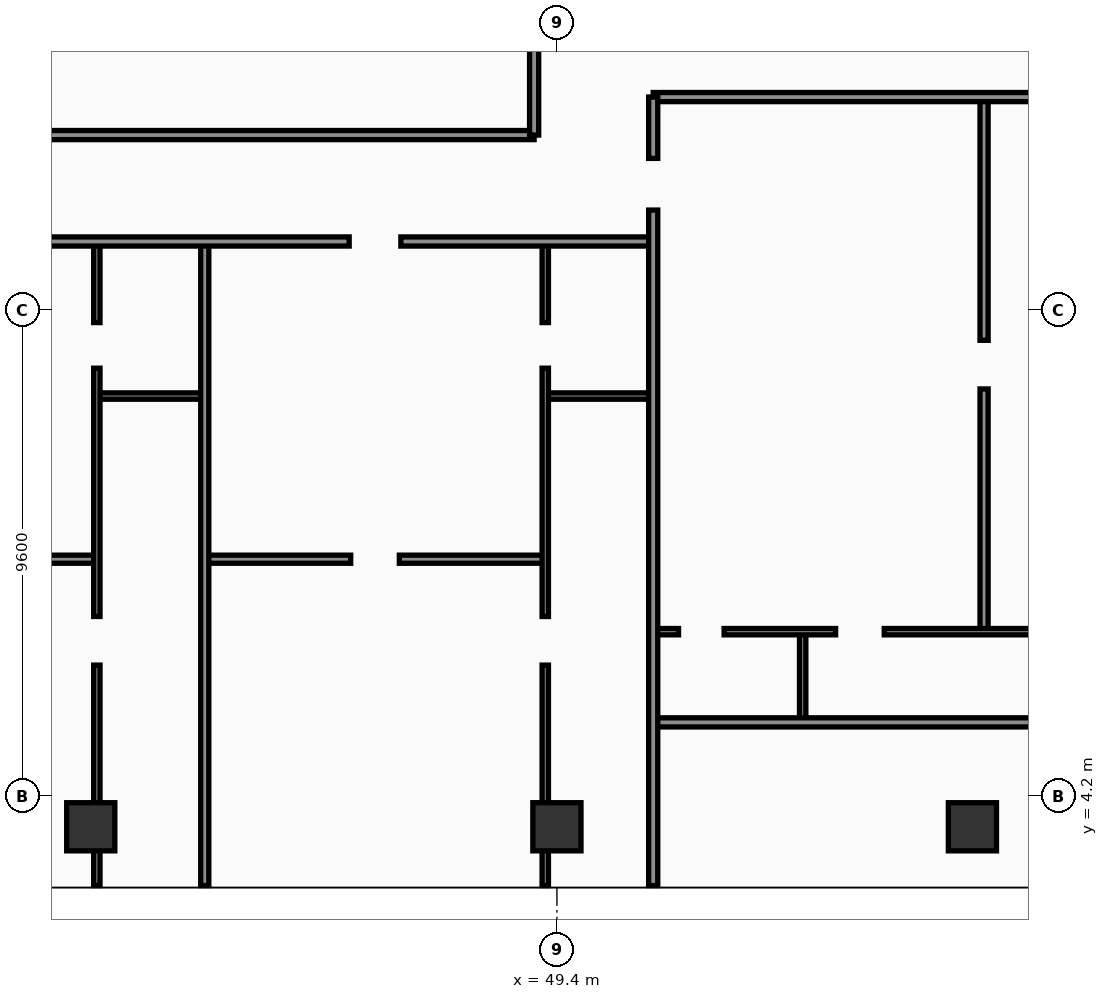
"""IFC4 building model, lengths in metres.
Left out: names, types, materials, properties, quantities, classifications, styles, units other than length and angle.
Written with IfcOpenShell. Run it as: python <this file> out.ifc"""

import sys

from ifc_helpers import new_model, si_unit, direction, frame, frame_2d, origin, origin_2d, place, context, subcontext, project, spatial, rectangle, hollow_rectangle, extrude, element, fill, save


model = new_model("IFC4")
c1 = context("Model", 3, precision=1e-05, world=origin(), true_north=direction((0.0, 1.0)))
c2 = subcontext(c1, "Body", "Model", "MODEL_VIEW")
j1 = project(units=[si_unit("LENGTHUNIT", "METRE"), si_unit("PLANEANGLEUNIT", "RADIAN")], contexts=[c1])
p1 = place(None, origin())
s1 = spatial("IfcSite", under=j1, at=p1, CompositionType="ELEMENT")
p2 = place(p1, origin())
s2 = spatial("IfcBuilding", under=s1, at=p2, CompositionType="ELEMENT")
p3 = place(p2, frame((0.0, 0.0, 66.0)))
s3 = spatial("IfcBuildingStorey", under=s2, at=p3, CompositionType="ELEMENT", Elevation=66.0)
for number, where, z_axis, x_axis in (
    (1, (40.2, 3.6, 0.0), (0.0, 0.0, 1.0), (1.0, 0.0, 0.0)),
    (2, (49.4, 3.6, 0.0), (0.0, 0.0, 1.0), (1.0, 0.0, 0.0)),
    (3, (57.6, 3.6, 0.0), (0.0, 0.0, 1.0), (1.0, 0.0, 0.0)),
):
    element("IfcColumn", number, at=place(p3, frame(where, z_axis=z_axis, x_axis=x_axis)), inside=s3, PredefinedType="COLUMN", context=c2, shape_type="SweptSolid", body=[
        extrude(hollow_rectangle(XDim=0.95, YDim=0.95, WallThickness=0.04, at=origin_2d()), origin(), (0.0, 0.0, 1.0), 3.56),
    ])
p4 = place(p3, frame((63.63, 5.505, 0.0), z_axis=(0.0, 0.0, 1.0), x_axis=(-0.300501856448, 0.953781229775, 0.0)))
e4 = element("IfcWall", 4, at=p4, inside=s3, PredefinedType="SOLIDWALL", context=c2, shape_type="SweptSolid", body=[
    extrude(rectangle(XDim=30.814, YDim=0.32, at=frame_2d((15.407, 0.0))), origin(), (0.0, 0.0, 1.0), 3.56),
])
p5 = place(p4, frame((18.796, 0.0, 0.0)))
e5 = element("IfcOpeningElement", 5, at=p5, cuts=e4, PredefinedType="OPENING", context=c2, shape_type="SweptSolid", body=[
    extrude(rectangle(XDim=1.4, YDim=2.25, at=frame_2d((0.7, 1.125))), frame((0.0, 0.17, 0.0), z_axis=(0.0, -1.0, 0.0), x_axis=(1.0, 0.0, 0.0)), (0.0, 0.0, 1.0), 0.34),
])
p6 = place(p4, frame((2.65, 0.0, 0.75)))
e6 = element("IfcOpeningElement", 6, at=p6, cuts=e4, PredefinedType="OPENING", context=c2, shape_type="SweptSolid", body=[
    extrude(rectangle(XDim=1.5, YDim=1.6, at=frame_2d((0.75, 0.8))), frame((0.0, 0.17, 0.0), z_axis=(0.0, -1.0, 0.0), x_axis=(1.0, 0.0, 0.0)), (0.0, 0.0, 1.0), 0.34),
])
p7 = place(p4, frame((4.7, 0.0, 0.75)))
e7 = element("IfcOpeningElement", 7, at=p7, cuts=e4, PredefinedType="OPENING", context=c2, shape_type="SweptSolid", body=[
    extrude(rectangle(XDim=1.5, YDim=1.6, at=frame_2d((0.75, 0.8))), frame((0.0, 0.17, 0.0), z_axis=(0.0, -1.0, 0.0), x_axis=(1.0, 0.0, 0.0)), (0.0, 0.0, 1.0), 0.34),
])
p8 = place(p4, frame((7.8, 0.0, 0.75)))
e8 = element("IfcOpeningElement", 8, at=p8, cuts=e4, PredefinedType="OPENING", context=c2, shape_type="SweptSolid", body=[
    extrude(rectangle(XDim=1.5, YDim=1.6, at=frame_2d((0.75, 0.8))), frame((0.0, 0.17, 0.0), z_axis=(0.0, -1.0, 0.0), x_axis=(1.0, 0.0, 0.0)), (0.0, 0.0, 1.0), 0.34),
])
p9 = place(p4, frame((10.9, 0.0, 0.75)))
e9 = element("IfcOpeningElement", 9, at=p9, cuts=e4, PredefinedType="OPENING", context=c2, shape_type="SweptSolid", body=[
    extrude(rectangle(XDim=1.5, YDim=1.6, at=frame_2d((0.75, 0.8))), frame((0.0, 0.17, 0.0), z_axis=(0.0, -1.0, 0.0), x_axis=(1.0, 0.0, 0.0)), (0.0, 0.0, 1.0), 0.34),
])
p10 = place(p4, frame((14.0, 0.0, 0.75)))
e10 = element("IfcOpeningElement", 10, at=p10, cuts=e4, PredefinedType="OPENING", context=c2, shape_type="SweptSolid", body=[
    extrude(rectangle(XDim=1.5, YDim=1.6, at=frame_2d((0.75, 0.8))), frame((0.0, 0.17, 0.0), z_axis=(0.0, -1.0, 0.0), x_axis=(1.0, 0.0, 0.0)), (0.0, 0.0, 1.0), 0.34),
])
p11 = place(p4, frame((16.55, 0.0, 0.75)))
e11 = element("IfcOpeningElement", 11, at=p11, cuts=e4, PredefinedType="OPENING", context=c2, shape_type="SweptSolid", body=[
    extrude(rectangle(XDim=1.5, YDim=1.6, at=frame_2d((0.75, 0.8))), frame((0.0, 0.17, 0.0), z_axis=(0.0, -1.0, 0.0), x_axis=(1.0, 0.0, 0.0)), (0.0, 0.0, 1.0), 0.34),
])
p12 = place(p4, frame((20.75, 0.0, 0.75)))
e12 = element("IfcOpeningElement", 12, at=p12, cuts=e4, PredefinedType="OPENING", context=c2, shape_type="SweptSolid", body=[
    extrude(rectangle(XDim=1.5, YDim=1.6, at=frame_2d((0.75, 0.8))), frame((0.0, 0.17, 0.0), z_axis=(0.0, -1.0, 0.0), x_axis=(1.0, 0.0, 0.0)), (0.0, 0.0, 1.0), 0.34),
])
p13 = place(p4, frame((23.3, 0.0, 0.75)))
e13 = element("IfcOpeningElement", 13, at=p13, cuts=e4, PredefinedType="OPENING", context=c2, shape_type="SweptSolid", body=[
    extrude(rectangle(XDim=1.5, YDim=1.6, at=frame_2d((0.75, 0.8))), frame((0.0, 0.17, 0.0), z_axis=(0.0, -1.0, 0.0), x_axis=(1.0, 0.0, 0.0)), (0.0, 0.0, 1.0), 0.34),
])
p14 = place(p4, frame((26.4, 0.0, 0.75)))
e14 = element("IfcOpeningElement", 14, at=p14, cuts=e4, PredefinedType="OPENING", context=c2, shape_type="SweptSolid", body=[
    extrude(rectangle(XDim=1.5, YDim=1.6, at=frame_2d((0.75, 0.8))), frame((0.0, 0.17, 0.0), z_axis=(0.0, -1.0, 0.0), x_axis=(1.0, 0.0, 0.0)), (0.0, 0.0, 1.0), 0.34),
])
p15 = place(p3, frame((40.32, 12.1, 0.0), z_axis=(0.0, 0.0, 1.0), x_axis=(1.0, 0.0, 0.0)))
e15 = element("IfcWall", 15, at=p15, inside=s3, PredefinedType="PARTITIONING", context=c2, shape_type="SweptSolid", body=[
    extrude(rectangle(XDim=2.13, YDim=0.125, at=frame_2d((1.065, 0.0))), origin(), (0.0, 0.0, 1.0), 3.56),
])
p16 = place(p3, frame((32.4, 8.88, 0.0), z_axis=(0.0, 0.0, 1.0), x_axis=(1.0, 0.0, 0.0)))
e16 = element("IfcWall", 16, at=p16, inside=s3, PredefinedType="PARTITIONING", context=c2, shape_type="SweptSolid", body=[
    extrude(rectangle(XDim=7.92, YDim=0.16, at=frame_2d((3.96, 0.0))), origin(), (0.0, 0.0, 1.0), 2.84),
])
p17 = place(p16, frame((3.48, 0.0, 0.0)))
e17 = element("IfcOpeningElement", 17, at=p17, cuts=e16, PredefinedType="OPENING", context=c2, shape_type="SweptSolid", body=[
    extrude(rectangle(XDim=0.96, YDim=2.2, at=frame_2d((0.48, 1.1))), frame((0.0, 0.09, 0.0), z_axis=(0.0, -1.0, 0.0), x_axis=(1.0, 0.0, 0.0)), (0.0, 0.0, 1.0), 0.18),
])
p18 = place(p3, frame((40.32, 2.44, 0.0), z_axis=(0.0, 0.0, 1.0), x_axis=(0.0, 1.0, 0.0)))
e18 = element("IfcWall", 18, at=p18, inside=s3, PredefinedType="PARTITIONING", context=c2, shape_type="SweptSolid", body=[
    extrude(rectangle(XDim=12.71, YDim=0.125, at=frame_2d((6.355, 0.0))), origin(), (0.0, 0.0, 1.0), 2.84),
])
p19 = place(p18, frame((4.35, 0.0, 0.0)))
e19 = element("IfcOpeningElement", 19, at=p19, cuts=e18, PredefinedType="OPENING", context=c2, shape_type="SweptSolid", body=[
    extrude(rectangle(XDim=0.96, YDim=2.2, at=frame_2d((0.48, 1.1))), frame((0.0, 0.073, 0.0), z_axis=(0.0, -1.0, 0.0), x_axis=(1.0, 0.0, 0.0)), (0.0, 0.0, 1.0), 0.145),
])
p20 = place(p18, frame((10.21, 0.0, 0.0)))
e20 = element("IfcOpeningElement", 20, at=p20, cuts=e18, PredefinedType="OPENING", context=c2, shape_type="SweptSolid", body=[
    extrude(rectangle(XDim=0.9, YDim=2.15, at=frame_2d((0.45, 1.075))), frame((0.0, 0.073, 0.0), z_axis=(0.0, -1.0, 0.0), x_axis=(1.0, 0.0, 0.0)), (0.0, 0.0, 1.0), 0.145),
])
p21 = place(p3, frame((49.17, 12.1, 0.0), z_axis=(0.0, 0.0, 1.0), x_axis=(1.0, 0.0, 0.0)))
e21 = element("IfcWall", 21, at=p21, inside=s3, PredefinedType="PARTITIONING", context=c2, shape_type="SweptSolid", body=[
    extrude(rectangle(XDim=2.13, YDim=0.125, at=frame_2d((1.065, 0.0))), origin(), (0.0, 0.0, 1.0), 3.56),
])
p22 = place(p3, frame((42.45, 8.88, 0.0), z_axis=(0.0, 0.0, 1.0), x_axis=(1.0, 0.0, 0.0)))
e22 = element("IfcWall", 22, at=p22, inside=s3, PredefinedType="PARTITIONING", context=c2, shape_type="SweptSolid", body=[
    extrude(rectangle(XDim=6.72, YDim=0.16, at=frame_2d((3.36, 0.0))), origin(), (0.0, 0.0, 1.0), 2.84),
])
p23 = place(p22, frame((2.88, 0.0, 0.0)))
e23 = element("IfcOpeningElement", 23, at=p23, cuts=e22, PredefinedType="OPENING", context=c2, shape_type="SweptSolid", body=[
    extrude(rectangle(XDim=0.96, YDim=2.2, at=frame_2d((0.48, 1.1))), frame((0.0, 0.09, 0.0), z_axis=(0.0, -1.0, 0.0), x_axis=(1.0, 0.0, 0.0)), (0.0, 0.0, 1.0), 0.18),
])
p24 = place(p3, frame((49.17, 2.44, 0.0), z_axis=(0.0, 0.0, 1.0), x_axis=(0.0, 1.0, 0.0)))
e24 = element("IfcWall", 24, at=p24, inside=s3, PredefinedType="PARTITIONING", context=c2, shape_type="SweptSolid", body=[
    extrude(rectangle(XDim=12.71, YDim=0.125, at=frame_2d((6.355, 0.0))), origin(), (0.0, 0.0, 1.0), 2.84),
])
p25 = place(p24, frame((4.35, 0.0, 0.0)))
e25 = element("IfcOpeningElement", 25, at=p25, cuts=e24, PredefinedType="OPENING", context=c2, shape_type="SweptSolid", body=[
    extrude(rectangle(XDim=0.96, YDim=2.2, at=frame_2d((0.48, 1.1))), frame((0.0, 0.073, 0.0), z_axis=(0.0, -1.0, 0.0), x_axis=(1.0, 0.0, 0.0)), (0.0, 0.0, 1.0), 0.145),
])
p26 = place(p24, frame((10.21, 0.0, 0.0)))
e26 = element("IfcOpeningElement", 26, at=p26, cuts=e24, PredefinedType="OPENING", context=c2, shape_type="SweptSolid", body=[
    extrude(rectangle(XDim=0.9, YDim=2.15, at=frame_2d((0.45, 1.075))), frame((0.0, 0.073, 0.0), z_axis=(0.0, -1.0, 0.0), x_axis=(1.0, 0.0, 0.0)), (0.0, 0.0, 1.0), 0.145),
])
p27 = place(p3, frame((42.45, 2.44, 0.0), z_axis=(0.0, 0.0, 1.0), x_axis=(0.0, 1.0, 0.0)))
e27 = element("IfcWall", 27, at=p27, inside=s3, PredefinedType="PARTITIONING", context=c2, shape_type="SweptSolid", body=[
    extrude(rectangle(XDim=12.71, YDim=0.16, at=frame_2d((6.355, 0.0))), origin(), (0.0, 0.0, 1.0), 3.04),
])
p28 = place(p3, frame((32.4, 15.15, 0.0), z_axis=(0.0, 0.0, 1.0), x_axis=(1.0, 0.0, 0.0)))
e28 = element("IfcWall", 28, at=p28, inside=s3, PredefinedType="PARTITIONING", context=c2, shape_type="SweptSolid", body=[
    extrude(rectangle(XDim=18.9, YDim=0.18, at=frame_2d((9.45, 0.0))), origin(), (0.0, 0.0, 1.0), 2.84),
])
p29 = place(p28, frame((3.55, 0.0, 0.0)))
e29 = element("IfcOpeningElement", 29, at=p29, cuts=e28, PredefinedType="OPENING", context=c2, shape_type="SweptSolid", body=[
    extrude(rectangle(XDim=1.02, YDim=2.2, at=frame_2d((0.51, 1.1))), frame((0.0, 0.1, 0.0), z_axis=(0.0, -1.0, 0.0), x_axis=(1.0, 0.0, 0.0)), (0.0, 0.0, 1.0), 0.2),
])
p30 = place(p28, frame((12.9, 0.0, 0.0)))
e30 = element("IfcOpeningElement", 30, at=p30, cuts=e28, PredefinedType="OPENING", context=c2, shape_type="SweptSolid", body=[
    extrude(rectangle(XDim=1.02, YDim=2.2, at=frame_2d((0.51, 1.1))), frame((0.0, 0.1, 0.0), z_axis=(0.0, -1.0, 0.0), x_axis=(1.0, 0.0, 0.0)), (0.0, 0.0, 1.0), 0.2),
])
p31 = place(p3, frame((21.5, 17.25, 0.0), z_axis=(0.0, 0.0, 1.0), x_axis=(1.0, 0.0, 0.0)))
e31 = element("IfcWall", 31, at=p31, inside=s3, PredefinedType="PARTITIONING", context=c2, shape_type="SweptSolid", body=[
    extrude(rectangle(XDim=27.45, YDim=0.18, at=frame_2d((13.725, 0.0))), origin(), (0.0, 0.0, 1.0), 2.84),
])
p32 = place(p31, frame((0.95, 0.0, 0.0)))
e32 = element("IfcOpeningElement", 32, at=p32, cuts=e31, PredefinedType="OPENING", context=c2, shape_type="SweptSolid", body=[
    extrude(rectangle(XDim=1.02, YDim=2.2, at=frame_2d((0.51, 1.1))), frame((0.0, 0.1, 0.0), z_axis=(0.0, -1.0, 0.0), x_axis=(1.0, 0.0, 0.0)), (0.0, 0.0, 1.0), 0.2),
])
p33 = place(p31, frame((15.28, 0.0, 0.0)))
e33 = element("IfcOpeningElement", 33, at=p33, cuts=e31, PredefinedType="OPENING", context=c2, shape_type="SweptSolid", body=[
    extrude(rectangle(XDim=1.02, YDim=2.2, at=frame_2d((0.51, 1.1))), frame((0.0, 0.1, 0.0), z_axis=(0.0, -1.0, 0.0), x_axis=(1.0, 0.0, 0.0)), (0.0, 0.0, 1.0), 0.2),
])
p34 = place(p3, frame((48.95, 17.25, 0.0), z_axis=(0.0, 0.0, 1.0), x_axis=(0.0, 1.0, 0.0)))
e34 = element("IfcWall", 34, at=p34, inside=s3, PredefinedType="PARTITIONING", context=c2, shape_type="SweptSolid", body=[
    extrude(rectangle(XDim=20.15, YDim=0.18, at=frame_2d((10.075, 0.0))), origin(), (0.0, 0.0, 1.0), 2.84),
])
p35 = place(p3, frame((54.25, 5.66, 0.0), z_axis=(0.0, 0.0, 1.0), x_axis=(0.0, 1.0, 0.0)))
e35 = element("IfcWall", 35, at=p35, inside=s3, PredefinedType="PARTITIONING", context=c2, shape_type="SweptSolid", body=[
    extrude(rectangle(XDim=1.79, YDim=0.125, at=frame_2d((0.895, 0.0))), origin(), (0.0, 0.0, 1.0), 3.56),
])
p36 = place(p3, frame((57.83, 7.45, 0.0), z_axis=(0.0, 0.0, 1.0), x_axis=(0.0, 1.0, 0.0)))
e36 = element("IfcWall", 36, at=p36, inside=s3, PredefinedType="PARTITIONING", context=c2, shape_type="SweptSolid", body=[
    extrude(rectangle(XDim=10.55, YDim=0.16, at=frame_2d((5.275, 0.0))), origin(), (0.0, 0.0, 1.0), 3.04),
])
p37 = place(p36, frame((4.79, 0.0, 0.0)))
e37 = element("IfcOpeningElement", 37, at=p37, cuts=e36, PredefinedType="OPENING", context=c2, shape_type="SweptSolid", body=[
    extrude(rectangle(XDim=0.96, YDim=2.2, at=frame_2d((0.48, 1.1))), frame((0.0, 0.09, 0.0), z_axis=(0.0, -1.0, 0.0), x_axis=(1.0, 0.0, 0.0)), (0.0, 0.0, 1.0), 0.18),
])
p38 = place(p3, frame((51.3, 7.45, 0.0), z_axis=(0.0, 0.0, 1.0), x_axis=(1.0, 0.0, 0.0)))
e38 = element("IfcWall", 38, at=p38, inside=s3, PredefinedType="PARTITIONING", context=c2, shape_type="SweptSolid", body=[
    extrude(rectangle(XDim=11.66, YDim=0.125, at=frame_2d((5.83, 0.0))), origin(), (0.0, 0.0, 1.0), 3.04),
])
p39 = place(p38, frame((0.5, 0.0, 0.0)))
e39 = element("IfcOpeningElement", 39, at=p39, cuts=e38, PredefinedType="OPENING", context=c2, shape_type="SweptSolid", body=[
    extrude(rectangle(XDim=0.9, YDim=2.15, at=frame_2d((0.45, 1.075))), frame((0.0, 0.073, 0.0), z_axis=(0.0, -1.0, 0.0), x_axis=(1.0, 0.0, 0.0)), (0.0, 0.0, 1.0), 0.145),
])
p40 = place(p38, frame((3.6, 0.0, 0.0)))
e40 = element("IfcOpeningElement", 40, at=p40, cuts=e38, PredefinedType="OPENING", context=c2, shape_type="SweptSolid", body=[
    extrude(rectangle(XDim=0.96, YDim=2.2, at=frame_2d((0.48, 1.1))), frame((0.0, 0.073, 0.0), z_axis=(0.0, -1.0, 0.0), x_axis=(1.0, 0.0, 0.0)), (0.0, 0.0, 1.0), 0.145),
])
p41 = place(p3, frame((51.3, 5.66, 0.0), z_axis=(0.0, 0.0, 1.0), x_axis=(1.0, 0.0, 0.0)))
e41 = element("IfcWall", 41, at=p41, inside=s3, PredefinedType="PARTITIONING", context=c2, shape_type="SweptSolid", body=[
    extrude(rectangle(XDim=9.1, YDim=0.18, at=frame_2d((4.55, 0.0))), origin(), (0.0, 0.0, 1.0), 3.04),
])
p42 = place(p3, frame((51.3, 18.0, 0.0), z_axis=(0.0, 0.0, 1.0), x_axis=(1.0, 0.0, 0.0)))
e42 = element("IfcWall", 42, at=p42, inside=s3, PredefinedType="PARTITIONING", context=c2, shape_type="SweptSolid", body=[
    extrude(rectangle(XDim=8.33, YDim=0.18, at=frame_2d((4.165, 0.0))), origin(), (0.0, 0.0, 1.0), 3.04),
])
p43 = place(p3, frame((51.3, 2.44, 0.0), z_axis=(0.0, 0.0, 1.0), x_axis=(0.0, 1.0, 0.0)))
e43 = element("IfcWall", 43, at=p43, inside=s3, PredefinedType="PARTITIONING", context=c2, shape_type="SweptSolid", body=[
    extrude(rectangle(XDim=15.56, YDim=0.18, at=frame_2d((7.78, 0.0))), origin(), (0.0, 0.0, 1.0), 3.04),
])
p44 = place(p43, frame((13.33, 0.0, 0.0)))
e44 = element("IfcOpeningElement", 44, at=p44, cuts=e43, PredefinedType="OPENING", context=c2, shape_type="SweptSolid", body=[
    extrude(rectangle(XDim=1.02, YDim=2.2, at=frame_2d((0.51, 1.1))), frame((0.0, 0.1, 0.0), z_axis=(0.0, -1.0, 0.0), x_axis=(1.0, 0.0, 0.0)), (0.0, 0.0, 1.0), 0.2),
])
p45 = place(p19, origin())
e45 = element("IfcDoor", 45, at=p45, inside=s3, OperationType="SINGLE_SWING_LEFT", PredefinedType="DOOR", context=c2, shape_type="SweptSolid", body=[
    extrude(rectangle(XDim=0.96, YDim=2.2, at=frame_2d((0.48, 1.1))), frame((0.0, 0.025, 0.0), z_axis=(0.0, -1.0, 0.0), x_axis=(1.0, 0.0, 0.0)), (0.0, 0.0, 1.0), 0.05),
])
fill(e19, e45)
p46 = place(p20, origin())
e46 = element("IfcDoor", 46, at=p46, inside=s3, OperationType="SINGLE_SWING_RIGHT", PredefinedType="DOOR", context=c2, shape_type="SweptSolid", body=[
    extrude(rectangle(XDim=0.9, YDim=2.15, at=frame_2d((0.45, 1.075))), frame((0.0, 0.025, 0.0), z_axis=(0.0, -1.0, 0.0), x_axis=(1.0, 0.0, 0.0)), (0.0, 0.0, 1.0), 0.05),
])
fill(e20, e46)
p47 = place(p23, origin())
e47 = element("IfcDoor", 47, at=p47, inside=s3, OperationType="SINGLE_SWING_LEFT", PredefinedType="DOOR", context=c2, shape_type="SweptSolid", body=[
    extrude(rectangle(XDim=0.96, YDim=2.2, at=frame_2d((0.48, 1.1))), frame((0.0, 0.025, 0.0), z_axis=(0.0, -1.0, 0.0), x_axis=(1.0, 0.0, 0.0)), (0.0, 0.0, 1.0), 0.05),
])
fill(e23, e47)
p48 = place(p25, origin())
e48 = element("IfcDoor", 48, at=p48, inside=s3, OperationType="SINGLE_SWING_LEFT", PredefinedType="DOOR", context=c2, shape_type="SweptSolid", body=[
    extrude(rectangle(XDim=0.96, YDim=2.2, at=frame_2d((0.48, 1.1))), frame((0.0, 0.025, 0.0), z_axis=(0.0, -1.0, 0.0), x_axis=(1.0, 0.0, 0.0)), (0.0, 0.0, 1.0), 0.05),
])
fill(e25, e48)
p49 = place(p26, origin())
e49 = element("IfcDoor", 49, at=p49, inside=s3, OperationType="SINGLE_SWING_RIGHT", PredefinedType="DOOR", context=c2, shape_type="SweptSolid", body=[
    extrude(rectangle(XDim=0.9, YDim=2.15, at=frame_2d((0.45, 1.075))), frame((0.0, 0.025, 0.0), z_axis=(0.0, -1.0, 0.0), x_axis=(1.0, 0.0, 0.0)), (0.0, 0.0, 1.0), 0.05),
])
fill(e26, e49)
p50 = place(p30, origin())
e50 = element("IfcDoor", 50, at=p50, inside=s3, OperationType="SINGLE_SWING_RIGHT", PredefinedType="DOOR", context=c2, shape_type="SweptSolid", body=[
    extrude(rectangle(XDim=1.02, YDim=2.2, at=frame_2d((0.51, 1.1))), frame((0.0, 0.025, 0.0), z_axis=(0.0, -1.0, 0.0), x_axis=(1.0, 0.0, 0.0)), (0.0, 0.0, 1.0), 0.05),
])
fill(e30, e50)
p51 = place(p37, origin())
e51 = element("IfcDoor", 51, at=p51, inside=s3, OperationType="SINGLE_SWING_LEFT", PredefinedType="DOOR", context=c2, shape_type="SweptSolid", body=[
    extrude(rectangle(XDim=0.96, YDim=2.2, at=frame_2d((0.48, 1.1))), frame((0.0, 0.025, 0.0), z_axis=(0.0, -1.0, 0.0), x_axis=(1.0, 0.0, 0.0)), (0.0, 0.0, 1.0), 0.05),
])
fill(e37, e51)
p52 = place(p39, origin())
e52 = element("IfcDoor", 52, at=p52, inside=s3, OperationType="SINGLE_SWING_LEFT", PredefinedType="DOOR", context=c2, shape_type="SweptSolid", body=[
    extrude(rectangle(XDim=0.9, YDim=2.15, at=frame_2d((0.45, 1.075))), frame((0.0, 0.025, 0.0), z_axis=(0.0, -1.0, 0.0), x_axis=(1.0, 0.0, 0.0)), (0.0, 0.0, 1.0), 0.05),
])
fill(e39, e52)
p53 = place(p40, origin())
e53 = element("IfcDoor", 53, at=p53, inside=s3, OperationType="SINGLE_SWING_RIGHT", PredefinedType="DOOR", context=c2, shape_type="SweptSolid", body=[
    extrude(rectangle(XDim=0.96, YDim=2.2, at=frame_2d((0.48, 1.1))), frame((0.0, 0.025, 0.0), z_axis=(0.0, -1.0, 0.0), x_axis=(1.0, 0.0, 0.0)), (0.0, 0.0, 1.0), 0.05),
])
fill(e40, e53)
p54 = place(p44, origin())
e54 = element("IfcDoor", 54, at=p54, inside=s3, OperationType="SINGLE_SWING_LEFT", PredefinedType="DOOR", context=c2, shape_type="SweptSolid", body=[
    extrude(rectangle(XDim=1.02, YDim=2.2, at=frame_2d((0.51, 1.1))), frame((0.0, 0.025, 0.0), z_axis=(0.0, -1.0, 0.0), x_axis=(1.0, 0.0, 0.0)), (0.0, 0.0, 1.0), 0.05),
])
fill(e44, e54)
save(model, sys.argv[1])
